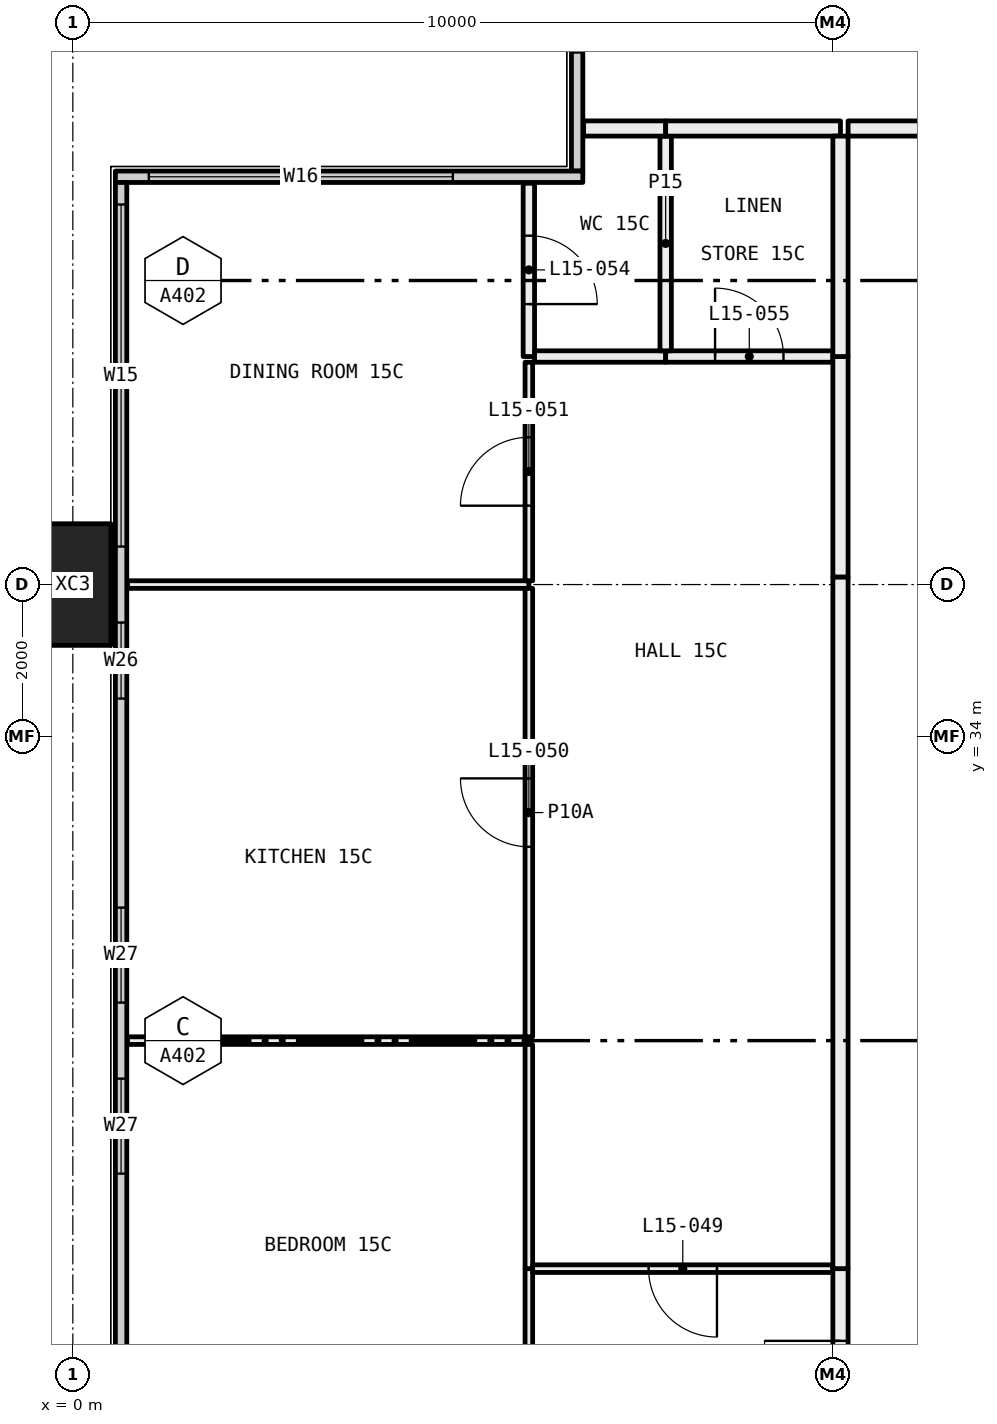
"""IFC4 building model, lengths in metres.
Left out: names, types, materials, properties, quantities, classifications, styles, units other than length and angle.
Written with IfcOpenShell. Run it as: python <this file> out.ifc"""

import sys

from ifc_helpers import new_model, si_unit, direction, frame, frame_2d, origin, origin_2d, place, context, subcontext, project, spatial, rectangle, hollow_rectangle, extrude, element, fill, save


model = new_model("IFC4")
c1 = context("Model", 3, precision=1e-05, world=origin(), true_north=direction((0.0, 1.0)))
c2 = subcontext(c1, "Body", "Model", "MODEL_VIEW")
j1 = project(units=[si_unit("LENGTHUNIT", "METRE"), si_unit("PLANEANGLEUNIT", "RADIAN")], contexts=[c1])
p1 = place(None, origin())
s1 = spatial("IfcSite", under=j1, at=p1, CompositionType="ELEMENT")
p2 = place(p1, origin())
s2 = spatial("IfcBuilding", under=s1, at=p2, CompositionType="ELEMENT")
p3 = place(p2, frame((0.0, 0.0, 64.5)))
s3 = spatial("IfcBuildingStorey", under=s2, at=p3, CompositionType="ELEMENT", Elevation=64.5)
p4 = place(p3, frame((0.0, 36.0, -0.4), z_axis=(0.0, 0.0, 1.0), x_axis=(0.0, 1.0, 0.0)))
e1 = element("IfcColumn", 1, at=p4, inside=s3, PredefinedType="COLUMN", context=c2, shape_type="SweptSolid", body=[
    extrude(hollow_rectangle(XDim=1.6, YDim=1.0, WallThickness=0.065, at=origin_2d()), origin(), (0.0, 0.0, 1.0), 3.45),
])
p5 = place(p3, frame((6.635, 41.44, 0.0), z_axis=(0.0, 0.0, 1.0), x_axis=(0.0, 1.0, 0.0)))
e2 = element("IfcWall", 2, at=p5, inside=s3, PredefinedType="ELEMENTEDWALL", context=c2, shape_type="SweptSolid", body=[
    extrude(rectangle(XDim=5.85, YDim=0.15, at=frame_2d((2.925, 0.0))), origin(), (0.0, 0.0, 1.0), 3.05),
])
p6 = place(p5, frame((1.56, 0.0, 0.45)))
e3 = element("IfcOpeningElement", 3, at=p6, cuts=e2, PredefinedType="OPENING", context=c2, shape_type="SweptSolid", body=[
    extrude(rectangle(XDim=4.0, YDim=2.55, at=frame_2d((2.0, 1.275))), frame((0.0, 0.085, 0.0), z_axis=(0.0, -1.0, 0.0), x_axis=(1.0, 0.0, 0.0)), (0.0, 0.0, 1.0), 0.17),
])
p7 = place(p3, frame((0.56, 41.365, 0.0), z_axis=(0.0, 0.0, 1.0), x_axis=(1.0, 0.0, 0.0)))
e4 = element("IfcWall", 4, at=p7, inside=s3, PredefinedType="ELEMENTEDWALL", context=c2, shape_type="SweptSolid", body=[
    extrude(rectangle(XDim=6.15, YDim=0.15, at=frame_2d((3.075, 0.0))), origin(), (0.0, 0.0, 1.0), 3.05),
])
p8 = place(p7, frame((0.44, 0.0, 0.45)))
e5 = element("IfcOpeningElement", 5, at=p8, cuts=e4, PredefinedType="OPENING", context=c2, shape_type="SweptSolid", body=[
    extrude(rectangle(XDim=4.0, YDim=2.55, at=frame_2d((2.0, 1.275))), frame((0.0, 0.085, 0.0), z_axis=(0.0, -1.0, 0.0), x_axis=(1.0, 0.0, 0.0)), (0.0, 0.0, 1.0), 0.17),
])
p9 = place(p3, frame((0.635, 6.71, 0.0), z_axis=(0.0, 0.0, 1.0), x_axis=(0.0, 1.0, 0.0)))
e6 = element("IfcWall", 6, at=p9, inside=s3, PredefinedType="ELEMENTEDWALL", context=c2, shape_type="SweptSolid", body=[
    extrude(rectangle(XDim=34.58, YDim=0.15, at=frame_2d((17.29, 0.0))), origin(), (0.0, 0.0, 1.0), 3.05),
])
p10 = place(p9, frame((0.29, 0.0, 0.45)))
e7 = element("IfcOpeningElement", 7, at=p10, cuts=e6, PredefinedType="OPENING", context=c2, shape_type="SweptSolid", body=[
    extrude(rectangle(XDim=4.5, YDim=2.55, at=frame_2d((2.25, 1.275))), frame((0.0, 0.085, 0.0), z_axis=(0.0, -1.0, 0.0), x_axis=(1.0, 0.0, 0.0)), (0.0, 0.0, 1.0), 0.17),
])
p11 = place(p9, frame((5.79, 0.0, 0.45)))
e8 = element("IfcOpeningElement", 8, at=p11, cuts=e6, PredefinedType="OPENING", context=c2, shape_type="SweptSolid", body=[
    extrude(rectangle(XDim=1.0, YDim=2.55, at=frame_2d((0.5, 1.275))), frame((0.0, 0.085, 0.0), z_axis=(0.0, -1.0, 0.0), x_axis=(1.0, 0.0, 0.0)), (0.0, 0.0, 1.0), 0.17),
])
p12 = place(p9, frame((9.54, 0.0, 0.45)))
e9 = element("IfcOpeningElement", 9, at=p12, cuts=e6, PredefinedType="OPENING", context=c2, shape_type="SweptSolid", body=[
    extrude(rectangle(XDim=1.25, YDim=2.55, at=frame_2d((0.625, 1.275))), frame((0.0, 0.085, 0.0), z_axis=(0.0, -1.0, 0.0), x_axis=(1.0, 0.0, 0.0)), (0.0, 0.0, 1.0), 0.17),
])
p13 = place(p9, frame((11.79, 0.0, 0.45)))
e10 = element("IfcOpeningElement", 10, at=p13, cuts=e6, PredefinedType="OPENING", context=c2, shape_type="SweptSolid", body=[
    extrude(rectangle(XDim=1.25, YDim=2.55, at=frame_2d((0.625, 1.275))), frame((0.0, 0.085, 0.0), z_axis=(0.0, -1.0, 0.0), x_axis=(1.0, 0.0, 0.0)), (0.0, 0.0, 1.0), 0.17),
])
p14 = place(p9, frame((15.79, 0.0, 0.45)))
e11 = element("IfcOpeningElement", 11, at=p14, cuts=e6, PredefinedType="OPENING", context=c2, shape_type="SweptSolid", body=[
    extrude(rectangle(XDim=1.0, YDim=2.55, at=frame_2d((0.5, 1.275))), frame((0.0, 0.085, 0.0), z_axis=(0.0, -1.0, 0.0), x_axis=(1.0, 0.0, 0.0)), (0.0, 0.0, 1.0), 0.17),
])
p15 = place(p9, frame((17.79, 0.0, 0.45)))
e12 = element("IfcOpeningElement", 12, at=p15, cuts=e6, PredefinedType="OPENING", context=c2, shape_type="SweptSolid", body=[
    extrude(rectangle(XDim=1.0, YDim=2.55, at=frame_2d((0.5, 1.275))), frame((0.0, 0.085, 0.0), z_axis=(0.0, -1.0, 0.0), x_axis=(1.0, 0.0, 0.0)), (0.0, 0.0, 1.0), 0.17),
])
p16 = place(p9, frame((21.54, 0.0, 0.45)))
e13 = element("IfcOpeningElement", 13, at=p16, cuts=e6, PredefinedType="OPENING", context=c2, shape_type="SweptSolid", body=[
    extrude(rectangle(XDim=1.25, YDim=2.55, at=frame_2d((0.625, 1.275))), frame((0.0, 0.085, 0.0), z_axis=(0.0, -1.0, 0.0), x_axis=(1.0, 0.0, 0.0)), (0.0, 0.0, 1.0), 0.17),
])
p17 = place(p9, frame((23.79, 0.0, 0.45)))
e14 = element("IfcOpeningElement", 14, at=p17, cuts=e6, PredefinedType="OPENING", context=c2, shape_type="SweptSolid", body=[
    extrude(rectangle(XDim=1.25, YDim=2.55, at=frame_2d((0.625, 1.275))), frame((0.0, 0.085, 0.0), z_axis=(0.0, -1.0, 0.0), x_axis=(1.0, 0.0, 0.0)), (0.0, 0.0, 1.0), 0.17),
])
p18 = place(p9, frame((27.79, 0.0, 0.45)))
e15 = element("IfcOpeningElement", 15, at=p18, cuts=e6, PredefinedType="OPENING", context=c2, shape_type="SweptSolid", body=[
    extrude(rectangle(XDim=1.0, YDim=2.55, at=frame_2d((0.5, 1.275))), frame((0.0, 0.085, 0.0), z_axis=(0.0, -1.0, 0.0), x_axis=(1.0, 0.0, 0.0)), (0.0, 0.0, 1.0), 0.17),
])
p19 = place(p9, frame((29.79, 0.0, 0.45)))
e16 = element("IfcOpeningElement", 16, at=p19, cuts=e6, PredefinedType="OPENING", context=c2, shape_type="SweptSolid", body=[
    extrude(rectangle(XDim=4.5, YDim=2.55, at=frame_2d((2.25, 1.275))), frame((0.0, 0.085, 0.0), z_axis=(0.0, -1.0, 0.0), x_axis=(1.0, 0.0, 0.0)), (0.0, 0.0, 1.0), 0.17),
])
p20 = place(p3, frame((6.0, 30.0, 0.0), z_axis=(0.0, 0.0, 1.0), x_axis=(-1.0, 0.0, 0.0)))
e17 = element("IfcWall", 17, at=p20, inside=s3, PredefinedType="PARTITIONING", context=c2, shape_type="SweptSolid", body=[
    extrude(rectangle(XDim=5.28, YDim=0.1, at=frame_2d((2.64, 0.0))), origin(), (0.0, 0.0, 1.0), 3.05),
])
p21 = place(p3, frame((6.0, 24.05, 0.0), z_axis=(0.0, 0.0, 1.0), x_axis=(0.0, 1.0, 0.0)))
e18 = element("IfcWall", 18, at=p21, inside=s3, PredefinedType="PARTITIONING", context=c2, shape_type="SweptSolid", body=[
    extrude(rectangle(XDim=2.95, YDim=0.1, at=frame_2d((1.475, 0.0))), origin(), (0.0, 0.0, 1.0), 2.45),
])
p22 = place(p3, frame((6.0, 27.0, 0.0), z_axis=(0.0, 0.0, 1.0), x_axis=(0.0, 1.0, 0.0)))
e19 = element("IfcWall", 19, at=p22, inside=s3, PredefinedType="PARTITIONING", context=c2, shape_type="SweptSolid", body=[
    extrude(rectangle(XDim=2.95, YDim=0.1, at=frame_2d((1.475, 0.0))), origin(), (0.0, 0.0, 1.0), 3.05),
])
p23 = place(p3, frame((6.0, 36.0, 0.0), z_axis=(0.0, 0.0, 1.0), x_axis=(-1.0, 0.0, 0.0)))
e20 = element("IfcWall", 20, at=p23, inside=s3, PredefinedType="PARTITIONING", context=c2, shape_type="SweptSolid", body=[
    extrude(rectangle(XDim=5.28, YDim=0.1, at=frame_2d((2.64, 0.0))), origin(), (0.0, 0.0, 1.0), 2.45),
])
p24 = place(p3, frame((6.0, 30.05, 0.0), z_axis=(0.0, 0.0, 1.0), x_axis=(0.0, 1.0, 0.0)))
e21 = element("IfcWall", 21, at=p24, inside=s3, PredefinedType="PARTITIONING", context=c2, shape_type="SweptSolid", body=[
    extrude(rectangle(XDim=5.9, YDim=0.1, at=frame_2d((2.95, 0.0))), origin(), (0.0, 0.0, 1.0), 2.45),
])
p25 = place(p24, frame((2.5, 0.0, 0.0)))
e22 = element("IfcOpeningElement", 22, at=p25, cuts=e21, PredefinedType="OPENING", context=c2, shape_type="SweptSolid", body=[
    extrude(rectangle(XDim=0.9, YDim=2.1, at=frame_2d((0.45, 1.05))), frame((0.0, 0.06, 0.0), z_axis=(0.0, -1.0, 0.0), x_axis=(1.0, 0.0, 0.0)), (0.0, 0.0, 1.0), 0.12),
])
p26 = place(p3, frame((6.0, 36.05, 0.0), z_axis=(0.0, 0.0, 1.0), x_axis=(0.0, 1.0, 0.0)))
e23 = element("IfcWall", 23, at=p26, inside=s3, PredefinedType="PARTITIONING", context=c2, shape_type="SweptSolid", body=[
    extrude(rectangle(XDim=2.875, YDim=0.1, at=frame_2d((1.438, 0.0))), origin(), (0.0, 0.0, 1.0), 2.45),
])
p27 = place(p26, frame((0.988, 0.0, 0.0)))
e24 = element("IfcOpeningElement", 24, at=p27, cuts=e23, PredefinedType="OPENING", context=c2, shape_type="SweptSolid", body=[
    extrude(rectangle(XDim=0.9, YDim=2.1, at=frame_2d((0.45, 1.05))), frame((0.0, 0.06, 0.0), z_axis=(0.0, -1.0, 0.0), x_axis=(1.0, 0.0, 0.0)), (0.0, 0.0, 1.0), 0.12),
])
p28 = place(p3, frame((6.0, 39.0, 0.0), z_axis=(0.0, 0.0, 1.0), x_axis=(0.0, 1.0, 0.0)))
e25 = element("IfcWall", 25, at=p28, inside=s3, PredefinedType="PARTITIONING", context=c2, shape_type="SweptSolid", body=[
    extrude(rectangle(XDim=2.28, YDim=0.15, at=frame_2d((1.14, 0.0))), origin(), (0.0, 0.0, 1.0), 3.05),
])
p29 = place(p28, frame((0.69, 0.0, 0.0)))
e26 = element("IfcOpeningElement", 26, at=p29, cuts=e25, PredefinedType="OPENING", context=c2, shape_type="SweptSolid", body=[
    extrude(rectangle(XDim=0.9, YDim=2.1, at=frame_2d((0.45, 1.05))), frame((0.0, 0.085, 0.0), z_axis=(0.0, -1.0, 0.0), x_axis=(1.0, 0.0, 0.0)), (0.0, 0.0, 1.0), 0.17),
])
p30 = place(p3, frame((10.0, 27.0, 0.0), z_axis=(0.0, 0.0, 1.0), x_axis=(-1.0, 0.0, 0.0)))
e27 = element("IfcWall", 27, at=p30, inside=s3, PredefinedType="PARTITIONING", context=c2, shape_type="SweptSolid", body=[
    extrude(rectangle(XDim=3.95, YDim=0.1, at=frame_2d((1.975, 0.0))), origin(), (0.0, 0.0, 1.0), 3.05),
])
p31 = place(p30, frame((1.525, 0.0, 0.0)))
e28 = element("IfcOpeningElement", 28, at=p31, cuts=e27, PredefinedType="OPENING", context=c2, shape_type="SweptSolid", body=[
    extrude(rectangle(XDim=0.9, YDim=2.1, at=frame_2d((0.45, 1.05))), frame((0.0, 0.06, 0.0), z_axis=(0.0, -1.0, 0.0), x_axis=(1.0, 0.0, 0.0)), (0.0, 0.0, 1.0), 0.12),
])
p32 = place(p3, frame((10.1, 24.1, 0.0), z_axis=(0.0, 0.0, 1.0), x_axis=(0.0, 1.0, 0.0)))
e29 = element("IfcWall", 29, at=p32, inside=s3, PredefinedType="PARTITIONING", context=c2, shape_type="SweptSolid", body=[
    extrude(rectangle(XDim=2.9, YDim=0.2, at=frame_2d((1.45, 0.0))), origin(), (0.0, 0.0, 1.0), 3.05),
])
p33 = place(p32, frame((0.95, 0.0, 0.0)))
e30 = element("IfcOpeningElement", 30, at=p33, cuts=e29, PredefinedType="OPENING", context=c2, shape_type="SweptSolid", body=[
    extrude(rectangle(XDim=1.0, YDim=2.1, at=frame_2d((0.5, 1.05))), frame((0.0, 0.11, 0.0), z_axis=(0.0, -1.0, 0.0), x_axis=(1.0, 0.0, 0.0)), (0.0, 0.0, 1.0), 0.22),
])
p34 = place(p3, frame((7.8, 39.0, 0.0), z_axis=(0.0, 0.0, 1.0), x_axis=(-1.0, 0.0, 0.0)))
e31 = element("IfcWall", 31, at=p34, inside=s3, PredefinedType="PARTITIONING", context=c2, shape_type="SweptSolid", body=[
    extrude(rectangle(XDim=1.725, YDim=0.15, at=frame_2d((0.863, 0.0))), origin(), (0.0, 0.0, 1.0), 3.05),
])
p35 = place(p3, frame((10.0, 39.0, 0.0), z_axis=(0.0, 0.0, 1.0), x_axis=(-1.0, 0.0, 0.0)))
e32 = element("IfcWall", 32, at=p35, inside=s3, PredefinedType="PARTITIONING", context=c2, shape_type="SweptSolid", body=[
    extrude(rectangle(XDim=2.2, YDim=0.15, at=frame_2d((1.1, 0.0))), origin(), (0.0, 0.0, 1.0), 3.05),
])
p36 = place(p35, frame((0.65, 0.0, 0.0)))
e33 = element("IfcOpeningElement", 33, at=p36, cuts=e32, PredefinedType="OPENING", context=c2, shape_type="SweptSolid", body=[
    extrude(rectangle(XDim=0.9, YDim=2.1, at=frame_2d((0.45, 1.05))), frame((0.0, 0.085, 0.0), z_axis=(0.0, -1.0, 0.0), x_axis=(1.0, 0.0, 0.0)), (0.0, 0.0, 1.0), 0.17),
])
p37 = place(p3, frame((10.1, 27.0, 0.0), z_axis=(0.0, 0.0, 1.0), x_axis=(0.0, 1.0, 0.0)))
e34 = element("IfcWall", 34, at=p37, inside=s3, PredefinedType="PARTITIONING", context=c2, shape_type="SweptSolid", body=[
    extrude(rectangle(XDim=9.1, YDim=0.2, at=frame_2d((4.55, 0.0))), origin(), (0.0, 0.0, 1.0), 2.45),
])
p38 = place(p3, frame((10.1, 36.1, 0.0), z_axis=(0.0, 0.0, 1.0), x_axis=(0.0, 1.0, 0.0)))
e35 = element("IfcWall", 35, at=p38, inside=s3, PredefinedType="PARTITIONING", context=c2, shape_type="SweptSolid", body=[
    extrude(rectangle(XDim=2.9, YDim=0.2, at=frame_2d((1.45, 0.0))), origin(), (0.0, 0.0, 1.0), 3.05),
])
p39 = place(p3, frame((7.8, 39.075, 0.0), z_axis=(0.0, 0.0, 1.0), x_axis=(0.0, 1.0, 0.0)))
e36 = element("IfcWall", 36, at=p39, inside=s3, PredefinedType="PARTITIONING", context=c2, shape_type="SweptSolid", body=[
    extrude(rectangle(XDim=2.825, YDim=0.15, at=frame_2d((1.413, 0.0))), origin(), (0.0, 0.0, 1.0), 3.05),
])
p40 = place(p3, frame((7.8, 42.0, 0.0), z_axis=(0.0, 0.0, 1.0), x_axis=(-1.0, 0.0, 0.0)))
e37 = element("IfcWall", 37, at=p40, inside=s3, PredefinedType="PARTITIONING", context=c2, shape_type="SweptSolid", body=[
    extrude(rectangle(XDim=1.08, YDim=0.2, at=frame_2d((0.54, 0.0))), origin(), (0.0, 0.0, 1.0), 3.05),
])
p41 = place(p3, frame((10.1, 42.0, 0.0), z_axis=(0.0, 0.0, 1.0), x_axis=(-1.0, 0.0, 0.0)))
e38 = element("IfcWall", 38, at=p41, inside=s3, PredefinedType="PARTITIONING", context=c2, shape_type="SweptSolid", body=[
    extrude(rectangle(XDim=2.3, YDim=0.2, at=frame_2d((1.15, 0.0))), origin(), (0.0, 0.0, 1.0), 3.05),
])
p42 = place(p3, frame((10.1, 39.0, 0.0), z_axis=(0.0, 0.0, 1.0), x_axis=(0.0, 1.0, 0.0)))
e39 = element("IfcWall", 39, at=p42, inside=s3, PredefinedType="PARTITIONING", context=c2, shape_type="SweptSolid", body=[
    extrude(rectangle(XDim=2.9, YDim=0.2, at=frame_2d((1.45, 0.0))), origin(), (0.0, 0.0, 1.0), 3.05),
])
p43 = place(p3, frame((10.2, 42.0, 0.0), z_axis=(0.0, 0.0, 1.0), x_axis=(1.0, 0.0, 0.0)))
e40 = element("IfcWall", 40, at=p43, inside=s3, PredefinedType="PARTITIONING", context=c2, shape_type="SweptSolid", body=[
    extrude(rectangle(XDim=1.8, YDim=0.2, at=frame_2d((0.9, 0.0))), origin(), (0.0, 0.0, 1.0), 3.05),
])
p44 = place(p8, origin())
e41 = element("IfcWindow", 41, at=p44, inside=s3, PartitioningType="SINGLE_PANEL", PredefinedType="WINDOW", context=c2, shape_type="SweptSolid", body=[
    extrude(rectangle(XDim=4.0, YDim=2.55, at=frame_2d((2.0, 1.275))), frame((0.0, 0.03, 0.0), z_axis=(0.0, -1.0, 0.0), x_axis=(1.0, 0.0, 0.0)), (0.0, 0.0, 1.0), 0.06),
])
fill(e5, e41)
p45 = place(p16, origin())
e42 = element("IfcWindow", 42, at=p45, inside=s3, PartitioningType="SINGLE_PANEL", PredefinedType="WINDOW", context=c2, shape_type="SweptSolid", body=[
    extrude(rectangle(XDim=1.25, YDim=2.55, at=frame_2d((0.625, 1.275))), frame((0.0, 0.03, 0.0), z_axis=(0.0, -1.0, 0.0), x_axis=(1.0, 0.0, 0.0)), (0.0, 0.0, 1.0), 0.06),
])
fill(e13, e42)
p46 = place(p17, origin())
e43 = element("IfcWindow", 43, at=p46, inside=s3, PartitioningType="SINGLE_PANEL", PredefinedType="WINDOW", context=c2, shape_type="SweptSolid", body=[
    extrude(rectangle(XDim=1.25, YDim=2.55, at=frame_2d((0.625, 1.275))), frame((0.0, 0.03, 0.0), z_axis=(0.0, -1.0, 0.0), x_axis=(1.0, 0.0, 0.0)), (0.0, 0.0, 1.0), 0.06),
])
fill(e14, e43)
p47 = place(p18, origin())
e44 = element("IfcWindow", 44, at=p47, inside=s3, PartitioningType="SINGLE_PANEL", PredefinedType="WINDOW", context=c2, shape_type="SweptSolid", body=[
    extrude(rectangle(XDim=1.0, YDim=2.55, at=frame_2d((0.5, 1.275))), frame((0.0, 0.03, 0.0), z_axis=(0.0, -1.0, 0.0), x_axis=(1.0, 0.0, 0.0)), (0.0, 0.0, 1.0), 0.06),
])
fill(e15, e44)
p48 = place(p19, origin())
e45 = element("IfcWindow", 45, at=p48, inside=s3, PartitioningType="SINGLE_PANEL", PredefinedType="WINDOW", context=c2, shape_type="SweptSolid", body=[
    extrude(rectangle(XDim=4.5, YDim=2.55, at=frame_2d((2.25, 1.275))), frame((0.0, 0.03, 0.0), z_axis=(0.0, -1.0, 0.0), x_axis=(1.0, 0.0, 0.0)), (0.0, 0.0, 1.0), 0.06),
])
fill(e16, e45)
p49 = place(p33, origin())
e46 = element("IfcDoor", 46, at=p49, inside=s3, OperationType="SINGLE_SWING_LEFT", PredefinedType="DOOR", context=c2, shape_type="SweptSolid", body=[
    extrude(rectangle(XDim=1.0, YDim=2.1, at=frame_2d((0.5, 1.05))), frame((0.0, 0.025, 0.0), z_axis=(0.0, -1.0, 0.0), x_axis=(1.0, 0.0, 0.0)), (0.0, 0.0, 1.0), 0.05),
])
fill(e30, e46)
p50 = place(p31, origin())
e47 = element("IfcDoor", 47, at=p50, inside=s3, OperationType="SINGLE_SWING_RIGHT", PredefinedType="DOOR", context=c2, shape_type="SweptSolid", body=[
    extrude(rectangle(XDim=0.9, YDim=2.1, at=frame_2d((0.45, 1.05))), frame((0.0, 0.025, 0.0), z_axis=(0.0, -1.0, 0.0), x_axis=(1.0, 0.0, 0.0)), (0.0, 0.0, 1.0), 0.05),
])
fill(e28, e47)
p51 = place(p25, origin())
e48 = element("IfcDoor", 48, at=p51, inside=s3, OperationType="SINGLE_SWING_LEFT", PredefinedType="DOOR", context=c2, shape_type="SweptSolid", body=[
    extrude(rectangle(XDim=0.9, YDim=2.1, at=frame_2d((0.45, 1.05))), frame((0.0, 0.025, 0.0), z_axis=(0.0, -1.0, 0.0), x_axis=(1.0, 0.0, 0.0)), (0.0, 0.0, 1.0), 0.05),
])
fill(e22, e48)
p52 = place(p27, origin())
e49 = element("IfcDoor", 49, at=p52, inside=s3, OperationType="SINGLE_SWING_RIGHT", PredefinedType="DOOR", context=c2, shape_type="SweptSolid", body=[
    extrude(rectangle(XDim=0.9, YDim=2.1, at=frame_2d((0.45, 1.05))), frame((0.0, 0.025, 0.0), z_axis=(0.0, -1.0, 0.0), x_axis=(1.0, 0.0, 0.0)), (0.0, 0.0, 1.0), 0.05),
])
fill(e24, e49)
p53 = place(p29, frame((0.9, 0.0, 0.0), x_axis=(-1.0, 0.0, 0.0)))
e50 = element("IfcDoor", 50, at=p53, inside=s3, OperationType="SINGLE_SWING_LEFT", PredefinedType="DOOR", context=c2, shape_type="SweptSolid", body=[
    extrude(rectangle(XDim=0.9, YDim=2.1, at=frame_2d((0.45, 1.05))), frame((0.0, 0.025, 0.0), z_axis=(0.0, -1.0, 0.0), x_axis=(1.0, 0.0, 0.0)), (0.0, 0.0, 1.0), 0.05),
])
fill(e26, e50)
p54 = place(p36, frame((0.9, 0.0, 0.0), x_axis=(-1.0, 0.0, 0.0)))
e51 = element("IfcDoor", 51, at=p54, inside=s3, OperationType="SINGLE_SWING_RIGHT", PredefinedType="DOOR", context=c2, shape_type="SweptSolid", body=[
    extrude(rectangle(XDim=0.9, YDim=2.1, at=frame_2d((0.45, 1.05))), frame((0.0, 0.025, 0.0), z_axis=(0.0, -1.0, 0.0), x_axis=(1.0, 0.0, 0.0)), (0.0, 0.0, 1.0), 0.05),
])
fill(e33, e51)
save(model, sys.argv[1])
